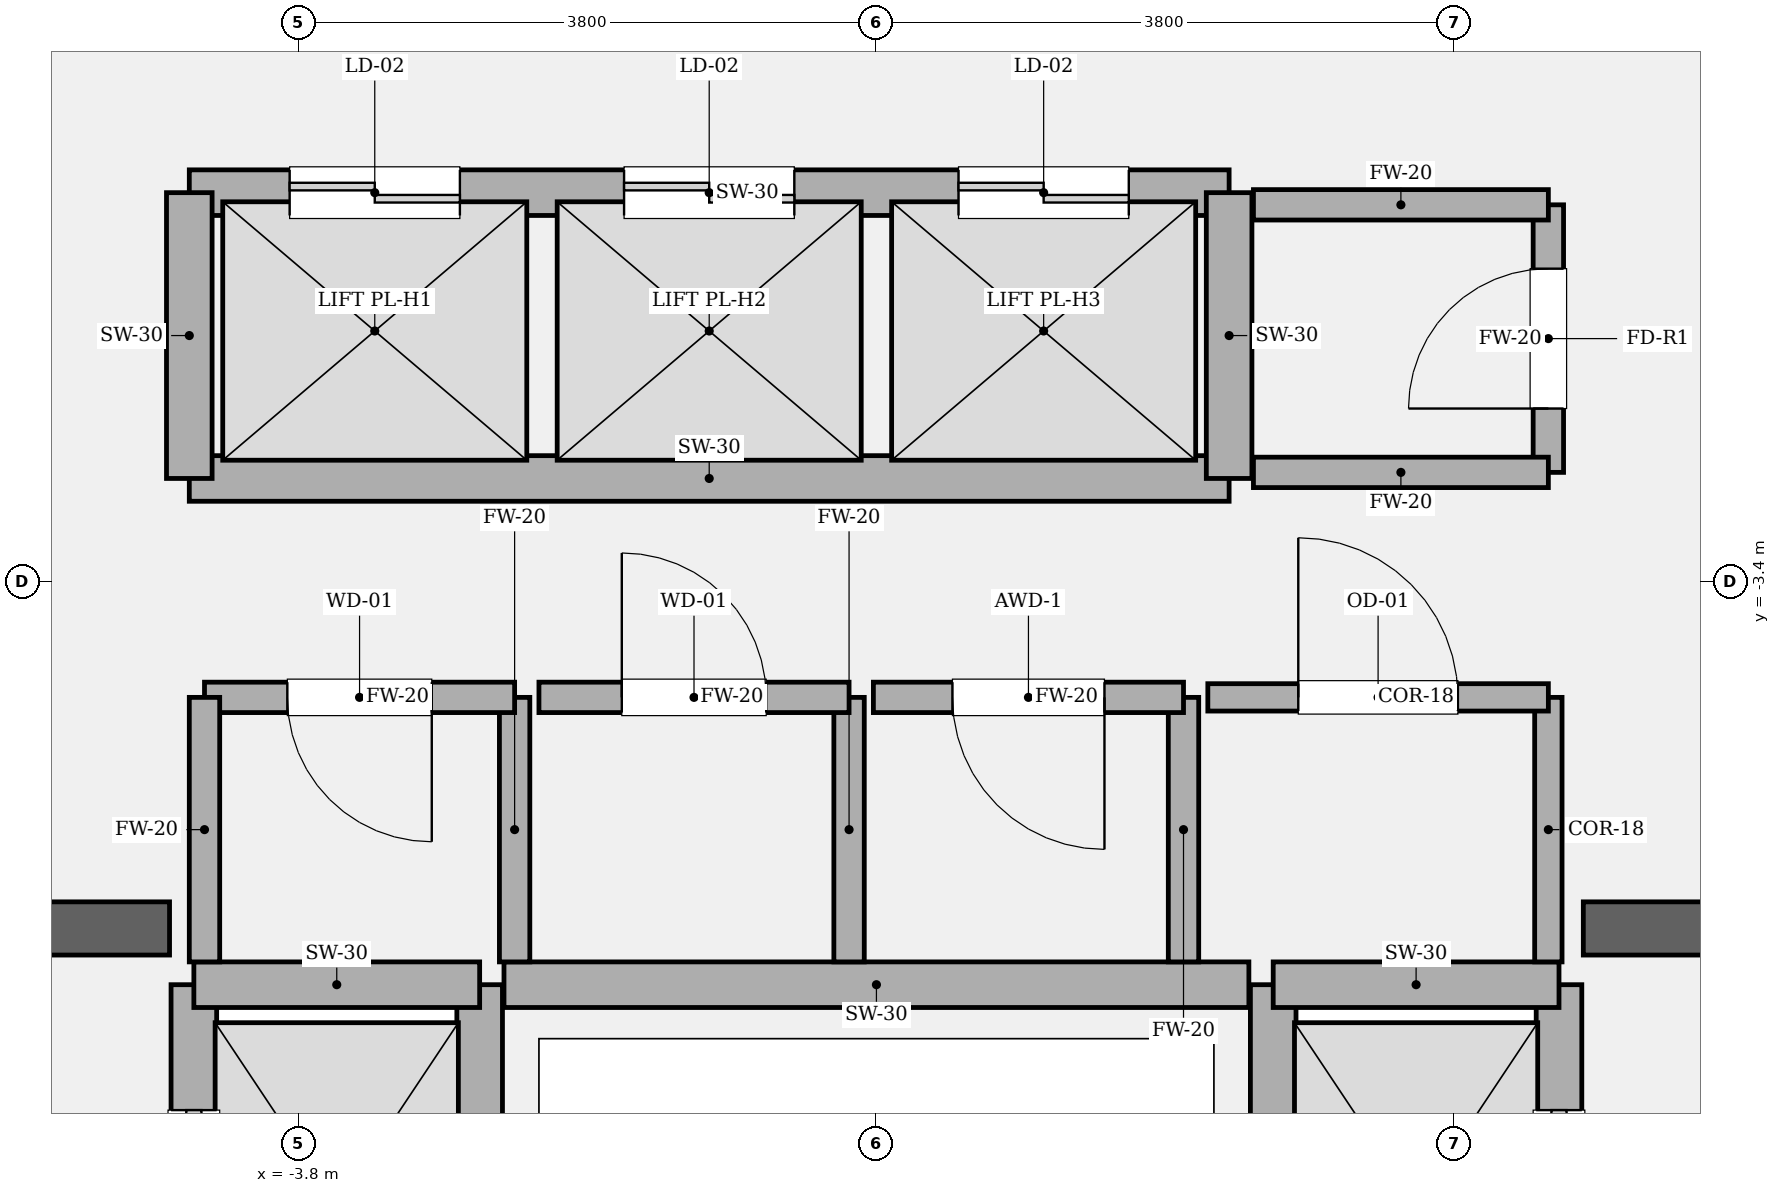
"""IFC4 building model, lengths in metres.
Left out: names, types, materials, properties, quantities, classifications, styles, units other than length and angle.
Written with IfcOpenShell. Run it as: python <this file> out.ifc"""

import sys

from ifc_helpers import new_model, si_unit, direction, frame, frame_2d, origin, place, context, subcontext, project, spatial, rectangle, extrude, element, fill, save


model = new_model("IFC4")
c1 = context("Model", 3, precision=1e-05, world=origin(), true_north=direction((0.0, 1.0)))
c2 = subcontext(c1, "Body", "Model", "MODEL_VIEW")
j1 = project(units=[si_unit("LENGTHUNIT", "METRE"), si_unit("PLANEANGLEUNIT", "RADIAN")], contexts=[c1])
p1 = place(None, origin())
s1 = spatial("IfcSite", under=j1, at=p1, CompositionType="ELEMENT")
p2 = place(p1, origin())
s2 = spatial("IfcBuilding", under=s1, at=p2, CompositionType="ELEMENT")
p3 = place(p2, frame((0.0, 0.0, 246.6)))
s3 = spatial("IfcBuildingStorey", under=s2, at=p3, CompositionType="ELEMENT", Elevation=246.6)
p4 = place(p3, frame((-9.925, -5.68, 0.0), z_axis=(0.0, 0.0, 1.0), x_axis=(1.0, 0.0, 0.0)))
e1 = element("IfcWall", 1, at=p4, inside=s3, PredefinedType="SOLIDWALL", context=c2, shape_type="SweptSolid", body=[
    extrude(rectangle(XDim=5.275, YDim=0.35, at=frame_2d((2.638, 0.0))), origin(), (0.0, 0.0, 1.0), 4.8),
])
p5 = place(p4, frame((1.385, 0.0, 0.0)))
e2 = element("IfcOpeningElement", 2, at=p5, cuts=e1, PredefinedType="OPENING", context=c2, shape_type="SweptSolid", body=[
    extrude(rectangle(XDim=1.18, YDim=2.2, at=frame_2d((0.59, 1.1))), frame((0.0, 0.185, 0.0), z_axis=(0.0, -1.0, 0.0), x_axis=(1.0, 0.0, 0.0)), (0.0, 0.0, 1.0), 0.37),
])
p6 = place(p3, frame((4.65, -5.68, 0.0), z_axis=(0.0, 0.0, 1.0), x_axis=(1.0, 0.0, 0.0)))
e3 = element("IfcWall", 3, at=p6, inside=s3, PredefinedType="SOLIDWALL", context=c2, shape_type="SweptSolid", body=[
    extrude(rectangle(XDim=5.275, YDim=0.35, at=frame_2d((2.638, 0.0))), origin(), (0.0, 0.0, 1.0), 4.8),
])
p7 = place(p6, frame((2.71, 0.0, 0.0)))
e4 = element("IfcOpeningElement", 4, at=p7, cuts=e3, PredefinedType="OPENING", context=c2, shape_type="SweptSolid", body=[
    extrude(rectangle(XDim=1.18, YDim=2.2, at=frame_2d((0.59, 1.1))), frame((0.0, 0.185, 0.0), z_axis=(0.0, -1.0, 0.0), x_axis=(1.0, 0.0, 0.0)), (0.0, 0.0, 1.0), 0.37),
])
p8 = place(p3, frame((-4.49, -8.82, 0.0), z_axis=(0.0, 0.0, 1.0), x_axis=(0.0, 1.0, 0.0)))
e5 = element("IfcWall", 5, at=p8, inside=s3, PredefinedType="SOLIDWALL", context=c2, shape_type="SweptSolid", body=[
    extrude(rectangle(XDim=2.77, YDim=0.3, at=frame_2d((1.385, 0.0))), origin(), (0.0, 0.0, 1.0), 4.52),
])
p9 = place(p8, frame((0.825, 0.0, 0.0)))
e6 = element("IfcOpeningElement", 6, at=p9, cuts=e5, PredefinedType="OPENING", context=c2, shape_type="SweptSolid", body=[
    extrude(rectangle(XDim=1.12, YDim=2.25, at=frame_2d((0.56, 1.125))), frame((0.0, 0.16, 0.0), z_axis=(0.0, -1.0, 0.0), x_axis=(1.0, 0.0, 0.0)), (0.0, 0.0, 1.0), 0.32),
])
p10 = place(p3, frame((-2.61, -8.82, 0.0), z_axis=(0.0, 0.0, 1.0), x_axis=(0.0, 1.0, 0.0)))
e7 = element("IfcWall", 7, at=p10, inside=s3, PredefinedType="SOLIDWALL", context=c2, shape_type="SweptSolid", body=[
    extrude(rectangle(XDim=2.77, YDim=0.3, at=frame_2d((1.385, 0.0))), origin(), (0.0, 0.0, 1.0), 4.52),
])
p11 = place(p3, frame((-4.49, -6.05, 0.0), z_axis=(0.0, 0.0, 1.0), x_axis=(1.0, 0.0, 0.0)))
e8 = element("IfcWall", 8, at=p11, inside=s3, PredefinedType="SOLIDWALL", context=c2, shape_type="SweptSolid", body=[
    extrude(rectangle(XDim=1.88, YDim=0.3, at=frame_2d((0.94, 0.0))), origin(), (0.0, 0.0, 1.0), 4.52),
])
p12 = place(p3, frame((4.49, -8.82, 0.0), z_axis=(0.0, 0.0, 1.0), x_axis=(0.0, 1.0, 0.0)))
e9 = element("IfcWall", 9, at=p12, inside=s3, PredefinedType="SOLIDWALL", context=c2, shape_type="SweptSolid", body=[
    extrude(rectangle(XDim=2.77, YDim=0.3, at=frame_2d((1.385, 0.0))), origin(), (0.0, 0.0, 1.0), 4.52),
])
p13 = place(p12, frame((0.825, 0.0, 0.0)))
e10 = element("IfcOpeningElement", 10, at=p13, cuts=e9, PredefinedType="OPENING", context=c2, shape_type="SweptSolid", body=[
    extrude(rectangle(XDim=1.12, YDim=2.25, at=frame_2d((0.56, 1.125))), frame((0.0, 0.16, 0.0), z_axis=(0.0, -1.0, 0.0), x_axis=(1.0, 0.0, 0.0)), (0.0, 0.0, 1.0), 0.32),
])
p14 = place(p3, frame((2.61, -8.82, 0.0), z_axis=(0.0, 0.0, 1.0), x_axis=(0.0, 1.0, 0.0)))
e11 = element("IfcWall", 11, at=p14, inside=s3, PredefinedType="SOLIDWALL", context=c2, shape_type="SweptSolid", body=[
    extrude(rectangle(XDim=2.77, YDim=0.3, at=frame_2d((1.385, 0.0))), origin(), (0.0, 0.0, 1.0), 4.52),
])
p15 = place(p3, frame((2.61, -6.05, 0.0), z_axis=(0.0, 0.0, 1.0), x_axis=(1.0, 0.0, 0.0)))
e12 = element("IfcWall", 12, at=p15, inside=s3, PredefinedType="SOLIDWALL", context=c2, shape_type="SweptSolid", body=[
    extrude(rectangle(XDim=1.88, YDim=0.3, at=frame_2d((0.94, 0.0))), origin(), (0.0, 0.0, 1.0), 4.52),
])
p16 = place(p3, frame((-4.52, -0.84, 0.0), z_axis=(0.0, 0.0, 1.0), x_axis=(1.0, 0.0, 0.0)))
e13 = element("IfcWall", 13, at=p16, inside=s3, PredefinedType="SOLIDWALL", context=c2, shape_type="SweptSolid", body=[
    extrude(rectangle(XDim=6.84, YDim=0.3, at=frame_2d((3.42, 0.0))), origin(), (0.0, 0.0, 1.0), 4.52),
])
p17 = place(p16, frame((0.66, 0.0, 0.0)))
e14 = element("IfcOpeningElement", 14, at=p17, cuts=e13, PredefinedType="OPENING", context=c2, shape_type="SweptSolid", body=[
    extrude(rectangle(XDim=1.12, YDim=2.25, at=frame_2d((0.56, 1.125))), frame((0.0, 0.16, 0.0), z_axis=(0.0, -1.0, 0.0), x_axis=(1.0, 0.0, 0.0)), (0.0, 0.0, 1.0), 0.32),
])
p18 = place(p16, frame((2.86, 0.0, 0.0)))
e15 = element("IfcOpeningElement", 15, at=p18, cuts=e13, PredefinedType="OPENING", context=c2, shape_type="SweptSolid", body=[
    extrude(rectangle(XDim=1.12, YDim=2.25, at=frame_2d((0.56, 1.125))), frame((0.0, 0.16, 0.0), z_axis=(0.0, -1.0, 0.0), x_axis=(1.0, 0.0, 0.0)), (0.0, 0.0, 1.0), 0.32),
])
p19 = place(p16, frame((5.06, 0.0, 0.0)))
e16 = element("IfcOpeningElement", 16, at=p19, cuts=e13, PredefinedType="OPENING", context=c2, shape_type="SweptSolid", body=[
    extrude(rectangle(XDim=1.12, YDim=2.25, at=frame_2d((0.56, 1.125))), frame((0.0, 0.16, 0.0), z_axis=(0.0, -1.0, 0.0), x_axis=(1.0, 0.0, 0.0)), (0.0, 0.0, 1.0), 0.32),
])
p20 = place(p3, frame((-4.52, -2.72, 0.0), z_axis=(0.0, 0.0, 1.0), x_axis=(1.0, 0.0, 0.0)))
e17 = element("IfcWall", 17, at=p20, inside=s3, PredefinedType="SOLIDWALL", context=c2, shape_type="SweptSolid", body=[
    extrude(rectangle(XDim=6.84, YDim=0.3, at=frame_2d((3.42, 0.0))), origin(), (0.0, 0.0, 1.0), 4.52),
])
for number, where, z_axis, x_axis in (
    (18, (-4.52, -2.72, 0.0), (0.0, 0.0, 1.0), (0.0, 1.0, 0.0)),
    (19, (2.32, -2.72, 0.0), (0.0, 0.0, 1.0), (0.0, 1.0, 0.0)),
):
    element("IfcWall", number, at=place(p3, frame(where, z_axis=z_axis, x_axis=x_axis)), inside=s3, PredefinedType="SOLIDWALL", context=c2, shape_type="SweptSolid", body=[
        extrude(rectangle(XDim=1.88, YDim=0.3, at=frame_2d((0.94, 0.0))), origin(), (0.0, 0.0, 1.0), 4.52),
    ])
p21 = place(p3, frame((-2.45, -6.05, 0.0), z_axis=(0.0, 0.0, 1.0), x_axis=(1.0, 0.0, 0.0)))
e20 = element("IfcWall", 20, at=p21, inside=s3, PredefinedType="SOLIDWALL", context=c2, shape_type="SweptSolid", body=[
    extrude(rectangle(XDim=4.9, YDim=0.3, at=frame_2d((2.45, 0.0))), origin(), (0.0, 0.0, 1.0), 4.52),
])
p22 = place(p3, frame((-2.38, -5.9, 0.0), z_axis=(0.0, 0.0, 1.0), x_axis=(0.0, 1.0, 0.0)))
e21 = element("IfcWall", 21, at=p22, inside=s3, PredefinedType="SOLIDWALL", context=c2, shape_type="SweptSolid", body=[
    extrude(rectangle(XDim=1.74, YDim=0.2, at=frame_2d((0.87, 0.0))), origin(), (0.0, 0.0, 1.0), 4.52),
])
p23 = place(p3, frame((-2.38, -4.16, 0.0), z_axis=(0.0, 0.0, 1.0), x_axis=(-1.0, 0.0, 0.0)))
e22 = element("IfcWall", 22, at=p23, inside=s3, PredefinedType="SOLIDWALL", context=c2, shape_type="SweptSolid", body=[
    extrude(rectangle(XDim=2.04, YDim=0.2, at=frame_2d((1.02, 0.0))), origin(), (0.0, 0.0, 1.0), 4.52),
])
p24 = place(p23, frame((0.545, 0.0, 0.0)))
e23 = element("IfcOpeningElement", 23, at=p24, cuts=e22, PredefinedType="OPENING", context=c2, shape_type="SweptSolid", body=[
    extrude(rectangle(XDim=0.95, YDim=2.15, at=frame_2d((0.475, 1.075))), frame((0.0, 0.11, 0.0), z_axis=(0.0, -1.0, 0.0), x_axis=(1.0, 0.0, 0.0)), (0.0, 0.0, 1.0), 0.22),
])
for number, where, z_axis, x_axis in (
    (24, (-4.42, -4.16, 0.0), (0.0, 0.0, 1.0), (0.0, -1.0, 0.0)),
    (25, (-0.18, -5.9, 0.0), (0.0, 0.0, 1.0), (0.0, 1.0, 0.0)),
):
    element("IfcWall", number, at=place(p3, frame(where, z_axis=z_axis, x_axis=x_axis)), inside=s3, PredefinedType="SOLIDWALL", context=c2, shape_type="SweptSolid", body=[
        extrude(rectangle(XDim=1.74, YDim=0.2, at=frame_2d((0.87, 0.0))), origin(), (0.0, 0.0, 1.0), 4.52),
    ])
p25 = place(p3, frame((-0.18, -4.16, 0.0), z_axis=(0.0, 0.0, 1.0), x_axis=(-1.0, 0.0, 0.0)))
e26 = element("IfcWall", 26, at=p25, inside=s3, PredefinedType="SOLIDWALL", context=c2, shape_type="SweptSolid", body=[
    extrude(rectangle(XDim=2.04, YDim=0.2, at=frame_2d((1.02, 0.0))), origin(), (0.0, 0.0, 1.0), 4.52),
])
p26 = place(p25, frame((0.545, 0.0, 0.0)))
e27 = element("IfcOpeningElement", 27, at=p26, cuts=e26, PredefinedType="OPENING", context=c2, shape_type="SweptSolid", body=[
    extrude(rectangle(XDim=0.95, YDim=2.15, at=frame_2d((0.475, 1.075))), frame((0.0, 0.11, 0.0), z_axis=(0.0, -1.0, 0.0), x_axis=(1.0, 0.0, 0.0)), (0.0, 0.0, 1.0), 0.22),
])
p27 = place(p3, frame((2.02, -5.9, 0.0), z_axis=(0.0, 0.0, 1.0), x_axis=(0.0, 1.0, 0.0)))
e28 = element("IfcWall", 28, at=p27, inside=s3, PredefinedType="SOLIDWALL", context=c2, shape_type="SweptSolid", body=[
    extrude(rectangle(XDim=1.74, YDim=0.2, at=frame_2d((0.87, 0.0))), origin(), (0.0, 0.0, 1.0), 4.52),
])
p28 = place(p3, frame((2.02, -4.16, 0.0), z_axis=(0.0, 0.0, 1.0), x_axis=(-1.0, 0.0, 0.0)))
e29 = element("IfcWall", 29, at=p28, inside=s3, PredefinedType="SOLIDWALL", context=c2, shape_type="SweptSolid", body=[
    extrude(rectangle(XDim=2.04, YDim=0.2, at=frame_2d((1.02, 0.0))), origin(), (0.0, 0.0, 1.0), 4.52),
])
p29 = place(p28, frame((0.52, 0.0, 0.0)))
e30 = element("IfcOpeningElement", 30, at=p29, cuts=e29, PredefinedType="OPENING", context=c2, shape_type="SweptSolid", body=[
    extrude(rectangle(XDim=1.0, YDim=2.15, at=frame_2d((0.5, 1.075))), frame((0.0, 0.11, 0.0), z_axis=(0.0, -1.0, 0.0), x_axis=(1.0, 0.0, 0.0)), (0.0, 0.0, 1.0), 0.22),
])
p30 = place(p3, frame((4.42, -5.9, 0.0), z_axis=(0.0, 0.0, 1.0), x_axis=(0.0, 1.0, 0.0)))
e31 = element("IfcWall", 31, at=p30, inside=s3, PredefinedType="PARTITIONING", context=c2, shape_type="SweptSolid", body=[
    extrude(rectangle(XDim=1.74, YDim=0.18, at=frame_2d((0.87, 0.0))), origin(), (0.0, 0.0, 1.0), 4.52),
])
p31 = place(p3, frame((4.42, -4.16, 0.0), z_axis=(0.0, 0.0, 1.0), x_axis=(-1.0, 0.0, 0.0)))
e32 = element("IfcWall", 32, at=p31, inside=s3, PredefinedType="PARTITIONING", context=c2, shape_type="SweptSolid", body=[
    extrude(rectangle(XDim=2.24, YDim=0.18, at=frame_2d((1.12, 0.0))), origin(), (0.0, 0.0, 1.0), 4.52),
])
p32 = place(p31, frame((0.595, 0.0, 0.0)))
e33 = element("IfcOpeningElement", 33, at=p32, cuts=e32, PredefinedType="OPENING", context=c2, shape_type="SweptSolid", body=[
    extrude(rectangle(XDim=1.05, YDim=2.2, at=frame_2d((0.525, 1.1))), frame((0.0, 0.1, 0.0), z_axis=(0.0, -1.0, 0.0), x_axis=(1.0, 0.0, 0.0)), (0.0, 0.0, 1.0), 0.2),
])
p33 = place(p3, frame((4.42, -2.68, 0.0), z_axis=(0.0, 0.0, 1.0), x_axis=(0.0, 1.0, 0.0)))
e34 = element("IfcWall", 34, at=p33, inside=s3, PredefinedType="SOLIDWALL", context=c2, shape_type="SweptSolid", body=[
    extrude(rectangle(XDim=1.76, YDim=0.2, at=frame_2d((0.88, 0.0))), origin(), (0.0, 0.0, 1.0), 4.52),
])
p34 = place(p33, frame((0.42, 0.0, 0.0)))
e35 = element("IfcOpeningElement", 35, at=p34, cuts=e34, PredefinedType="OPENING", context=c2, shape_type="SweptSolid", body=[
    extrude(rectangle(XDim=0.92, YDim=2.1, at=frame_2d((0.46, 1.05))), frame((0.0, 0.11, 0.0), z_axis=(0.0, -1.0, 0.0), x_axis=(1.0, 0.0, 0.0)), (0.0, 0.0, 1.0), 0.22),
])
for number, where, z_axis, x_axis in (
    (36, (4.42, -0.92, 0.0), (0.0, 0.0, 1.0), (-1.0, 0.0, 0.0)),
    (37, (2.48, -2.68, 0.0), (0.0, 0.0, 1.0), (1.0, 0.0, 0.0)),
):
    element("IfcWall", number, at=place(p3, frame(where, z_axis=z_axis, x_axis=x_axis)), inside=s3, PredefinedType="SOLIDWALL", context=c2, shape_type="SweptSolid", body=[
        extrude(rectangle(XDim=1.94, YDim=0.2, at=frame_2d((0.97, 0.0))), origin(), (0.0, 0.0, 1.0), 4.52),
    ])
p35 = place(p9, origin())
e38 = element("IfcDoor", 38, at=p35, inside=s3, OperationType="SLIDING_TO_LEFT", PredefinedType="DOOR", context=c2, shape_type="SweptSolid", body=[
    extrude(rectangle(XDim=1.12, YDim=2.25, at=frame_2d((0.56, 1.125))), frame((0.0, 0.025, 0.0), z_axis=(0.0, -1.0, 0.0), x_axis=(1.0, 0.0, 0.0)), (0.0, 0.0, 1.0), 0.05),
])
fill(e6, e38)
p36 = place(p13, origin())
e39 = element("IfcDoor", 39, at=p36, inside=s3, OperationType="SLIDING_TO_RIGHT", PredefinedType="DOOR", context=c2, shape_type="SweptSolid", body=[
    extrude(rectangle(XDim=1.12, YDim=2.25, at=frame_2d((0.56, 1.125))), frame((0.0, 0.025, 0.0), z_axis=(0.0, -1.0, 0.0), x_axis=(1.0, 0.0, 0.0)), (0.0, 0.0, 1.0), 0.05),
])
fill(e10, e39)
p37 = place(p17, origin())
e40 = element("IfcDoor", 40, at=p37, inside=s3, OperationType="DOUBLE_DOOR_SLIDING", PredefinedType="DOOR", context=c2, shape_type="SweptSolid", body=[
    extrude(rectangle(XDim=1.12, YDim=2.25, at=frame_2d((0.56, 1.125))), frame((0.0, 0.025, 0.0), z_axis=(0.0, -1.0, 0.0), x_axis=(1.0, 0.0, 0.0)), (0.0, 0.0, 1.0), 0.05),
])
fill(e14, e40)
p38 = place(p18, origin())
e41 = element("IfcDoor", 41, at=p38, inside=s3, OperationType="DOUBLE_DOOR_SLIDING", PredefinedType="DOOR", context=c2, shape_type="SweptSolid", body=[
    extrude(rectangle(XDim=1.12, YDim=2.25, at=frame_2d((0.56, 1.125))), frame((0.0, 0.025, 0.0), z_axis=(0.0, -1.0, 0.0), x_axis=(1.0, 0.0, 0.0)), (0.0, 0.0, 1.0), 0.05),
])
fill(e15, e41)
p39 = place(p19, origin())
e42 = element("IfcDoor", 42, at=p39, inside=s3, OperationType="DOUBLE_DOOR_SLIDING", PredefinedType="DOOR", context=c2, shape_type="SweptSolid", body=[
    extrude(rectangle(XDim=1.12, YDim=2.25, at=frame_2d((0.56, 1.125))), frame((0.0, 0.025, 0.0), z_axis=(0.0, -1.0, 0.0), x_axis=(1.0, 0.0, 0.0)), (0.0, 0.0, 1.0), 0.05),
])
fill(e16, e42)
p40 = place(p24, origin())
e43 = element("IfcDoor", 43, at=p40, inside=s3, OperationType="SINGLE_SWING_LEFT", PredefinedType="DOOR", context=c2, shape_type="SweptSolid", body=[
    extrude(rectangle(XDim=0.95, YDim=2.15, at=frame_2d((0.475, 1.075))), frame((0.0, 0.025, 0.0), z_axis=(0.0, -1.0, 0.0), x_axis=(1.0, 0.0, 0.0)), (0.0, 0.0, 1.0), 0.05),
])
fill(e23, e43)
p41 = place(p26, origin())
e44 = element("IfcDoor", 44, at=p41, inside=s3, OperationType="SINGLE_SWING_RIGHT", PredefinedType="DOOR", context=c2, shape_type="SweptSolid", body=[
    extrude(rectangle(XDim=0.95, YDim=2.15, at=frame_2d((0.475, 1.075))), frame((0.0, 0.025, 0.0), z_axis=(0.0, -1.0, 0.0), x_axis=(1.0, 0.0, 0.0)), (0.0, 0.0, 1.0), 0.05),
])
fill(e27, e44)
p42 = place(p29, origin())
e45 = element("IfcDoor", 45, at=p42, inside=s3, OperationType="SINGLE_SWING_LEFT", PredefinedType="DOOR", context=c2, shape_type="SweptSolid", body=[
    extrude(rectangle(XDim=1.0, YDim=2.15, at=frame_2d((0.5, 1.075))), frame((0.0, 0.025, 0.0), z_axis=(0.0, -1.0, 0.0), x_axis=(1.0, 0.0, 0.0)), (0.0, 0.0, 1.0), 0.05),
])
fill(e30, e45)
p43 = place(p32, origin())
e46 = element("IfcDoor", 46, at=p43, inside=s3, OperationType="SINGLE_SWING_RIGHT", PredefinedType="DOOR", context=c2, shape_type="SweptSolid", body=[
    extrude(rectangle(XDim=1.05, YDim=2.2, at=frame_2d((0.525, 1.1))), frame((0.0, 0.025, 0.0), z_axis=(0.0, -1.0, 0.0), x_axis=(1.0, 0.0, 0.0)), (0.0, 0.0, 1.0), 0.05),
])
fill(e33, e46)
p44 = place(p34, origin())
e47 = element("IfcDoor", 47, at=p44, inside=s3, OperationType="SINGLE_SWING_LEFT", PredefinedType="DOOR", context=c2, shape_type="SweptSolid", body=[
    extrude(rectangle(XDim=0.92, YDim=2.1, at=frame_2d((0.46, 1.05))), frame((0.0, 0.025, 0.0), z_axis=(0.0, -1.0, 0.0), x_axis=(1.0, 0.0, 0.0)), (0.0, 0.0, 1.0), 0.05),
])
fill(e35, e47)
save(model, sys.argv[1])
